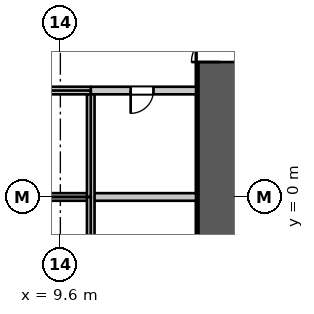
"""IFC4 building model, lengths in metres.
Left out: names, types, materials, properties, quantities, classifications, styles, units other than length and angle.
Written with IfcOpenShell. Run it as: python <this file> out.ifc"""

import sys

from ifc_helpers import new_model, si_unit, direction, frame, frame_2d, origin, place, context, subcontext, project, spatial, rectangle, extrude, element, fill, save


model = new_model("IFC4")
c1 = context("Model", 3, precision=1e-05, world=origin(), true_north=direction((0.0, 1.0)))
c2 = subcontext(c1, "Body", "Model", "MODEL_VIEW")
j1 = project(units=[si_unit("LENGTHUNIT", "METRE"), si_unit("PLANEANGLEUNIT", "RADIAN")], contexts=[c1])
p1 = place(None, origin())
s1 = spatial("IfcSite", under=j1, at=p1, CompositionType="ELEMENT")
p2 = place(p1, origin())
s2 = spatial("IfcBuilding", under=s1, at=p2, CompositionType="ELEMENT")
p3 = place(p2, frame((0.0, 0.0, 21.0)))
s3 = spatial("IfcBuildingStorey", under=s2, at=p3, CompositionType="ELEMENT", Elevation=21.0)
p4 = place(p3, frame((13.8, -10.8, 0.0), z_axis=(0.0, 0.0, 1.0), x_axis=(0.0, 1.0, 0.0)))
e1 = element("IfcWall", 1, at=p4, inside=s3, PredefinedType="SHEAR", context=c2, shape_type="SweptSolid", body=[
    extrude(rectangle(XDim=21.6, YDim=1.2, at=frame_2d((10.8, 0.0))), origin(), (0.0, 0.0, 1.0), 4.5),
])
p5 = place(p4, frame((14.35, 0.0, 0.0)))
e2 = element("IfcOpeningElement", 2, at=p5, cuts=e1, PredefinedType="OPENING", context=c2, shape_type="SweptSolid", body=[
    extrude(rectangle(XDim=1.5, YDim=2.4, at=frame_2d((0.75, 1.2))), frame((0.0, 0.61, 0.0), z_axis=(0.0, -1.0, 0.0), x_axis=(1.0, 0.0, 0.0)), (0.0, 0.0, 1.0), 1.22),
])
p6 = place(p4, frame((5.75, 0.0, 0.0)))
e3 = element("IfcOpeningElement", 3, at=p6, cuts=e1, PredefinedType="OPENING", context=c2, shape_type="SweptSolid", body=[
    extrude(rectangle(XDim=1.5, YDim=2.4, at=frame_2d((0.75, 1.2))), frame((0.0, 0.61, 0.0), z_axis=(0.0, -1.0, 0.0), x_axis=(1.0, 0.0, 0.0)), (0.0, 0.0, 1.0), 1.22),
])
p7 = place(p3, frame((10.4, 2.8, 0.0), z_axis=(0.0, 0.0, 1.0), x_axis=(1.0, 0.0, 0.0)))
e4 = element("IfcWall", 4, at=p7, inside=s3, PredefinedType="PARTITIONING", context=c2, shape_type="SweptSolid", body=[
    extrude(rectangle(XDim=2.77, YDim=0.2, at=frame_2d((1.385, 0.0))), origin(), (0.0, 0.0, 1.0), 4.25),
])
p8 = place(p7, frame((1.05, 0.0, 0.0)))
e5 = element("IfcOpeningElement", 5, at=p8, cuts=e4, PredefinedType="OPENING", context=c2, shape_type="SweptSolid", body=[
    extrude(rectangle(XDim=0.6, YDim=2.0, at=frame_2d((0.3, 1.0))), frame((0.0, 0.11, 0.0), z_axis=(0.0, -1.0, 0.0), x_axis=(1.0, 0.0, 0.0)), (0.0, 0.0, 1.0), 0.22),
])
p9 = place(p3, frame((10.4, 0.0, 0.0), z_axis=(0.0, 0.0, 1.0), x_axis=(1.0, 0.0, 0.0)))
e6 = element("IfcWall", 6, at=p9, inside=s3, PredefinedType="PARTITIONING", context=c2, shape_type="SweptSolid", body=[
    extrude(rectangle(XDim=2.77, YDim=0.2, at=frame_2d((1.385, 0.0))), origin(), (0.0, 0.0, 1.0), 4.25),
])
p10 = place(p3, frame((-13.17, 0.0, 0.0), z_axis=(0.0, 0.0, 1.0), x_axis=(1.0, 0.0, 0.0)))
e7 = element("IfcWall", 7, at=p10, inside=s3, PredefinedType="PARTITIONING", context=c2, shape_type="SweptSolid", body=[
    extrude(rectangle(XDim=23.57, YDim=0.2, at=frame_2d((11.785, 0.0))), origin(), (0.0, 0.0, 1.0), 4.25),
])
p11 = place(p3, frame((-13.17, 2.8, 0.0), z_axis=(0.0, 0.0, 1.0), x_axis=(1.0, 0.0, 0.0)))
e8 = element("IfcWall", 8, at=p11, inside=s3, PredefinedType="PARTITIONING", context=c2, shape_type="SweptSolid", body=[
    extrude(rectangle(XDim=23.57, YDim=0.2, at=frame_2d((11.785, 0.0))), origin(), (0.0, 0.0, 1.0), 4.25),
])
p12 = place(p11, frame((0.8, 0.0, 0.0)))
e9 = element("IfcOpeningElement", 9, at=p12, cuts=e8, PredefinedType="OPENING", context=c2, shape_type="SweptSolid", body=[
    extrude(rectangle(XDim=1.1, YDim=2.2, at=frame_2d((0.55, 1.1))), frame((0.0, 0.11, 0.0), z_axis=(0.0, -1.0, 0.0), x_axis=(1.0, 0.0, 0.0)), (0.0, 0.0, 1.0), 0.22),
])
p13 = place(p11, frame((3.5, 0.0, 0.0)))
e10 = element("IfcOpeningElement", 10, at=p13, cuts=e8, PredefinedType="OPENING", context=c2, shape_type="SweptSolid", body=[
    extrude(rectangle(XDim=1.1, YDim=2.2, at=frame_2d((0.55, 1.1))), frame((0.0, 0.11, 0.0), z_axis=(0.0, -1.0, 0.0), x_axis=(1.0, 0.0, 0.0)), (0.0, 0.0, 1.0), 0.22),
])
p14 = place(p11, frame((6.1, 0.0, 0.0)))
e11 = element("IfcOpeningElement", 11, at=p14, cuts=e8, PredefinedType="OPENING", context=c2, shape_type="SweptSolid", body=[
    extrude(rectangle(XDim=1.1, YDim=2.2, at=frame_2d((0.55, 1.1))), frame((0.0, 0.11, 0.0), z_axis=(0.0, -1.0, 0.0), x_axis=(1.0, 0.0, 0.0)), (0.0, 0.0, 1.0), 0.22),
])
p15 = place(p11, frame((8.7, 0.0, 0.0)))
e12 = element("IfcOpeningElement", 12, at=p15, cuts=e8, PredefinedType="OPENING", context=c2, shape_type="SweptSolid", body=[
    extrude(rectangle(XDim=1.1, YDim=2.2, at=frame_2d((0.55, 1.1))), frame((0.0, 0.11, 0.0), z_axis=(0.0, -1.0, 0.0), x_axis=(1.0, 0.0, 0.0)), (0.0, 0.0, 1.0), 0.22),
])
p16 = place(p11, frame((11.3, 0.0, 0.0)))
e13 = element("IfcOpeningElement", 13, at=p16, cuts=e8, PredefinedType="OPENING", context=c2, shape_type="SweptSolid", body=[
    extrude(rectangle(XDim=1.1, YDim=2.2, at=frame_2d((0.55, 1.1))), frame((0.0, 0.11, 0.0), z_axis=(0.0, -1.0, 0.0), x_axis=(1.0, 0.0, 0.0)), (0.0, 0.0, 1.0), 0.22),
])
p17 = place(p11, frame((13.9, 0.0, 0.0)))
e14 = element("IfcOpeningElement", 14, at=p17, cuts=e8, PredefinedType="OPENING", context=c2, shape_type="SweptSolid", body=[
    extrude(rectangle(XDim=1.1, YDim=2.2, at=frame_2d((0.55, 1.1))), frame((0.0, 0.11, 0.0), z_axis=(0.0, -1.0, 0.0), x_axis=(1.0, 0.0, 0.0)), (0.0, 0.0, 1.0), 0.22),
])
p18 = place(p11, frame((16.5, 0.0, 0.0)))
e15 = element("IfcOpeningElement", 15, at=p18, cuts=e8, PredefinedType="OPENING", context=c2, shape_type="SweptSolid", body=[
    extrude(rectangle(XDim=1.1, YDim=2.2, at=frame_2d((0.55, 1.1))), frame((0.0, 0.11, 0.0), z_axis=(0.0, -1.0, 0.0), x_axis=(1.0, 0.0, 0.0)), (0.0, 0.0, 1.0), 0.22),
])
p19 = place(p11, frame((19.1, 0.0, 0.0)))
e16 = element("IfcOpeningElement", 16, at=p19, cuts=e8, PredefinedType="OPENING", context=c2, shape_type="SweptSolid", body=[
    extrude(rectangle(XDim=1.1, YDim=2.2, at=frame_2d((0.55, 1.1))), frame((0.0, 0.11, 0.0), z_axis=(0.0, -1.0, 0.0), x_axis=(1.0, 0.0, 0.0)), (0.0, 0.0, 1.0), 0.22),
])
p20 = place(p3, frame((10.4, -2.7, 0.0), z_axis=(0.0, 0.0, 1.0), x_axis=(0.0, 1.0, 0.0)))
e17 = element("IfcWall", 17, at=p20, inside=s3, PredefinedType="PARTITIONING", context=c2, shape_type="SweptSolid", body=[
    extrude(rectangle(XDim=5.4, YDim=0.2, at=frame_2d((2.7, 0.0))), origin(), (0.0, 0.0, 1.0), 4.25),
])
p21 = place(p8, origin())
e18 = element("IfcDoor", 18, at=p21, inside=s3, OperationType="SINGLE_SWING_RIGHT", PredefinedType="DOOR", context=c2, shape_type="SweptSolid", body=[
    extrude(rectangle(XDim=0.6, YDim=2.0, at=frame_2d((0.3, 1.0))), frame((0.0, 0.025, 0.0), z_axis=(0.0, -1.0, 0.0), x_axis=(1.0, 0.0, 0.0)), (0.0, 0.0, 1.0), 0.05),
])
fill(e5, e18)
p22 = place(p5, origin())
e19 = element("IfcDoor", 19, at=p22, inside=s3, OperationType="DOUBLE_DOOR_SINGLE_SWING", PredefinedType="DOOR", context=c2, shape_type="SweptSolid", body=[
    extrude(rectangle(XDim=1.5, YDim=2.4, at=frame_2d((0.75, 1.2))), frame((0.0, 0.025, 0.0), z_axis=(0.0, -1.0, 0.0), x_axis=(1.0, 0.0, 0.0)), (0.0, 0.0, 1.0), 0.05),
])
fill(e2, e19)
save(model, sys.argv[1])
